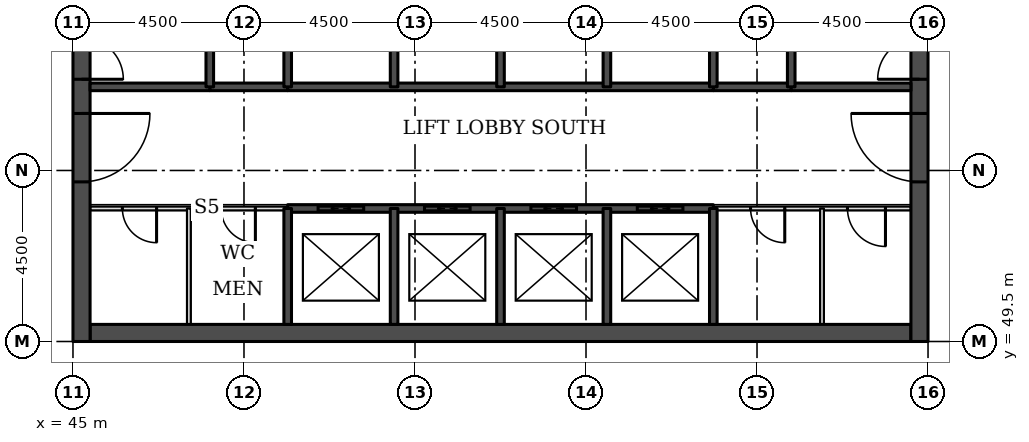
"""IFC4 building model, lengths in metres.
Left out: names, types, materials, properties, quantities, classifications, styles, units other than length and angle.
Written with IfcOpenShell. Run it as: python <this file> out.ifc"""

import sys

from ifc_helpers import new_model, si_unit, direction, frame, frame_2d, origin, place, context, subcontext, project, spatial, rectangle, extrude, element, fill, save


model = new_model("IFC4")
c1 = context("Model", 3, precision=1e-05, world=origin(), true_north=direction((0.0, 1.0)))
c2 = subcontext(c1, "Body", "Model", "MODEL_VIEW")
j1 = project(units=[si_unit("LENGTHUNIT", "METRE"), si_unit("PLANEANGLEUNIT", "RADIAN")], contexts=[c1])
p1 = place(None, origin())
s1 = spatial("IfcSite", under=j1, at=p1, CompositionType="ELEMENT")
p2 = place(p1, origin())
s2 = spatial("IfcBuilding", under=s1, at=p2, CompositionType="ELEMENT")
p3 = place(p2, frame((0.0, 0.0, 134.4)))
s3 = spatial("IfcBuildingStorey", under=s2, at=p3, CompositionType="ELEMENT", Elevation=134.4)
p4 = place(p3, frame((45.45, 49.725, 0.0), z_axis=(0.0, 0.0, 1.0), x_axis=(1.0, 0.0, 0.0)))
e1 = element("IfcWall", 1, at=p4, inside=s3, PredefinedType="SHEAR", context=c2, shape_type="SweptSolid", body=[
    extrude(rectangle(XDim=21.6, YDim=0.45, at=frame_2d((10.8, 0.0))), origin(), (0.0, 0.0, 1.0), 3.7),
])
p5 = place(p3, frame((45.225, 49.5, 0.0), z_axis=(0.0, 0.0, 1.0), x_axis=(0.0, 1.0, 0.0)))
e2 = element("IfcWall", 2, at=p5, inside=s3, PredefinedType="SHEAR", context=c2, shape_type="SweptSolid", body=[
    extrude(rectangle(XDim=22.5, YDim=0.45, at=frame_2d((11.25, 0.0))), origin(), (0.0, 0.0, 1.0), 3.7),
])
p6 = place(p5, frame((4.2, 0.0, 0.0)))
e3 = element("IfcOpeningElement", 3, at=p6, cuts=e2, PredefinedType="OPENING", context=c2, shape_type="SweptSolid", body=[
    extrude(rectangle(XDim=1.8, YDim=2.1, at=frame_2d((0.9, 1.05))), frame((0.0, 0.235, 0.0), z_axis=(0.0, -1.0, 0.0), x_axis=(1.0, 0.0, 0.0)), (0.0, 0.0, 1.0), 0.47),
])
p7 = place(p5, frame((6.9, 0.0, 0.0)))
e4 = element("IfcOpeningElement", 4, at=p7, cuts=e2, PredefinedType="OPENING", context=c2, shape_type="SweptSolid", body=[
    extrude(rectangle(XDim=1.1, YDim=2.1, at=frame_2d((0.55, 1.05))), frame((0.0, 0.235, 0.0), z_axis=(0.0, -1.0, 0.0), x_axis=(1.0, 0.0, 0.0)), (0.0, 0.0, 1.0), 0.47),
])
p8 = place(p5, frame((13.6, 0.0, 0.0)))
e5 = element("IfcOpeningElement", 5, at=p8, cuts=e2, PredefinedType="OPENING", context=c2, shape_type="SweptSolid", body=[
    extrude(rectangle(XDim=1.1, YDim=2.1, at=frame_2d((0.55, 1.05))), frame((0.0, 0.235, 0.0), z_axis=(0.0, -1.0, 0.0), x_axis=(1.0, 0.0, 0.0)), (0.0, 0.0, 1.0), 0.47),
])
p9 = place(p5, frame((16.5, 0.0, 0.0)))
e6 = element("IfcOpeningElement", 6, at=p9, cuts=e2, PredefinedType="OPENING", context=c2, shape_type="SweptSolid", body=[
    extrude(rectangle(XDim=1.8, YDim=2.1, at=frame_2d((0.9, 1.05))), frame((0.0, 0.235, 0.0), z_axis=(0.0, -1.0, 0.0), x_axis=(1.0, 0.0, 0.0)), (0.0, 0.0, 1.0), 0.47),
])
p10 = place(p3, frame((67.275, 49.5, 0.0), z_axis=(0.0, 0.0, 1.0), x_axis=(0.0, 1.0, 0.0)))
e7 = element("IfcWall", 7, at=p10, inside=s3, PredefinedType="SHEAR", context=c2, shape_type="SweptSolid", body=[
    extrude(rectangle(XDim=22.5, YDim=0.45, at=frame_2d((11.25, 0.0))), origin(), (0.0, 0.0, 1.0), 3.7),
])
p11 = place(p10, frame((4.2, 0.0, 0.0)))
e8 = element("IfcOpeningElement", 8, at=p11, cuts=e7, PredefinedType="OPENING", context=c2, shape_type="SweptSolid", body=[
    extrude(rectangle(XDim=1.8, YDim=2.1, at=frame_2d((0.9, 1.05))), frame((0.0, 0.235, 0.0), z_axis=(0.0, -1.0, 0.0), x_axis=(1.0, 0.0, 0.0)), (0.0, 0.0, 1.0), 0.47),
])
p12 = place(p10, frame((6.9, 0.0, 0.0)))
e9 = element("IfcOpeningElement", 9, at=p12, cuts=e7, PredefinedType="OPENING", context=c2, shape_type="SweptSolid", body=[
    extrude(rectangle(XDim=1.1, YDim=2.1, at=frame_2d((0.55, 1.05))), frame((0.0, 0.235, 0.0), z_axis=(0.0, -1.0, 0.0), x_axis=(1.0, 0.0, 0.0)), (0.0, 0.0, 1.0), 0.47),
])
p13 = place(p10, frame((13.6, 0.0, 0.0)))
e10 = element("IfcOpeningElement", 10, at=p13, cuts=e7, PredefinedType="OPENING", context=c2, shape_type="SweptSolid", body=[
    extrude(rectangle(XDim=1.1, YDim=2.1, at=frame_2d((0.55, 1.05))), frame((0.0, 0.235, 0.0), z_axis=(0.0, -1.0, 0.0), x_axis=(1.0, 0.0, 0.0)), (0.0, 0.0, 1.0), 0.47),
])
p14 = place(p10, frame((16.5, 0.0, 0.0)))
e11 = element("IfcOpeningElement", 11, at=p14, cuts=e7, PredefinedType="OPENING", context=c2, shape_type="SweptSolid", body=[
    extrude(rectangle(XDim=1.8, YDim=2.1, at=frame_2d((0.9, 1.05))), frame((0.0, 0.235, 0.0), z_axis=(0.0, -1.0, 0.0), x_axis=(1.0, 0.0, 0.0)), (0.0, 0.0, 1.0), 0.47),
])
p15 = place(p3, frame((45.45, 53.0, 0.0), z_axis=(0.0, 0.0, 1.0), x_axis=(1.0, 0.0, 0.0)))
e12 = element("IfcWall", 12, at=p15, inside=s3, PredefinedType="PARTITIONING", context=c2, shape_type="SweptSolid", body=[
    extrude(rectangle(XDim=5.2, YDim=0.1, at=frame_2d((2.6, 0.0))), origin(), (0.0, 0.0, 1.0), 3.55),
])
p16 = place(p15, frame((0.85, 0.0, 0.0)))
e13 = element("IfcOpeningElement", 13, at=p16, cuts=e12, PredefinedType="OPENING", context=c2, shape_type="SweptSolid", body=[
    extrude(rectangle(XDim=0.9, YDim=2.1, at=frame_2d((0.45, 1.05))), frame((0.0, 0.06, 0.0), z_axis=(0.0, -1.0, 0.0), x_axis=(1.0, 0.0, 0.0)), (0.0, 0.0, 1.0), 0.12),
])
p17 = place(p15, frame((3.45, 0.0, 0.0)))
e14 = element("IfcOpeningElement", 14, at=p17, cuts=e12, PredefinedType="OPENING", context=c2, shape_type="SweptSolid", body=[
    extrude(rectangle(XDim=0.9, YDim=2.1, at=frame_2d((0.45, 1.05))), frame((0.0, 0.06, 0.0), z_axis=(0.0, -1.0, 0.0), x_axis=(1.0, 0.0, 0.0)), (0.0, 0.0, 1.0), 0.12),
])
p18 = place(p3, frame((61.85, 53.0, 0.0), z_axis=(0.0, 0.0, 1.0), x_axis=(1.0, 0.0, 0.0)))
e15 = element("IfcWall", 15, at=p18, inside=s3, PredefinedType="PARTITIONING", context=c2, shape_type="SweptSolid", body=[
    extrude(rectangle(XDim=5.2, YDim=0.1, at=frame_2d((2.6, 0.0))), origin(), (0.0, 0.0, 1.0), 3.55),
])
p19 = place(p18, frame((3.53, 0.0, 0.0)))
e16 = element("IfcOpeningElement", 16, at=p19, cuts=e15, PredefinedType="OPENING", context=c2, shape_type="SweptSolid", body=[
    extrude(rectangle(XDim=1.0, YDim=2.1, at=frame_2d((0.5, 1.05))), frame((0.0, 0.06, 0.0), z_axis=(0.0, -1.0, 0.0), x_axis=(1.0, 0.0, 0.0)), (0.0, 0.0, 1.0), 0.12),
])
p20 = place(p18, frame((0.98, 0.0, 0.0)))
e17 = element("IfcOpeningElement", 17, at=p20, cuts=e15, PredefinedType="OPENING", context=c2, shape_type="SweptSolid", body=[
    extrude(rectangle(XDim=0.9, YDim=2.1, at=frame_2d((0.45, 1.05))), frame((0.0, 0.06, 0.0), z_axis=(0.0, -1.0, 0.0), x_axis=(1.0, 0.0, 0.0)), (0.0, 0.0, 1.0), 0.12),
])
p21 = place(p3, frame((50.65, 53.0, 0.0), z_axis=(0.0, 0.0, 1.0), x_axis=(1.0, 0.0, 0.0)))
e18 = element("IfcWall", 18, at=p21, inside=s3, PredefinedType="SOLIDWALL", context=c2, shape_type="SweptSolid", body=[
    extrude(rectangle(XDim=11.2, YDim=0.2, at=frame_2d((5.6, 0.0))), origin(), (0.0, 0.0, 1.0), 3.55),
])
p22 = place(p21, frame((0.8, 0.0, 0.0)))
e19 = element("IfcOpeningElement", 19, at=p22, cuts=e18, PredefinedType="OPENING", context=c2, shape_type="SweptSolid", body=[
    extrude(rectangle(XDim=1.2, YDim=2.1, at=frame_2d((0.6, 1.05))), frame((0.0, 0.11, 0.0), z_axis=(0.0, -1.0, 0.0), x_axis=(1.0, 0.0, 0.0)), (0.0, 0.0, 1.0), 0.22),
])
p23 = place(p21, frame((3.6, 0.0, 0.0)))
e20 = element("IfcOpeningElement", 20, at=p23, cuts=e18, PredefinedType="OPENING", context=c2, shape_type="SweptSolid", body=[
    extrude(rectangle(XDim=1.2, YDim=2.1, at=frame_2d((0.6, 1.05))), frame((0.0, 0.11, 0.0), z_axis=(0.0, -1.0, 0.0), x_axis=(1.0, 0.0, 0.0)), (0.0, 0.0, 1.0), 0.22),
])
p24 = place(p21, frame((6.4, 0.0, 0.0)))
e21 = element("IfcOpeningElement", 21, at=p24, cuts=e18, PredefinedType="OPENING", context=c2, shape_type="SweptSolid", body=[
    extrude(rectangle(XDim=1.2, YDim=2.1, at=frame_2d((0.6, 1.05))), frame((0.0, 0.11, 0.0), z_axis=(0.0, -1.0, 0.0), x_axis=(1.0, 0.0, 0.0)), (0.0, 0.0, 1.0), 0.22),
])
p25 = place(p21, frame((9.2, 0.0, 0.0)))
e22 = element("IfcOpeningElement", 22, at=p25, cuts=e18, PredefinedType="OPENING", context=c2, shape_type="SweptSolid", body=[
    extrude(rectangle(XDim=1.2, YDim=2.1, at=frame_2d((0.6, 1.05))), frame((0.0, 0.11, 0.0), z_axis=(0.0, -1.0, 0.0), x_axis=(1.0, 0.0, 0.0)), (0.0, 0.0, 1.0), 0.22),
])
for number, where, z_axis, x_axis in (
    (23, (48.6, 56.2, 0.0), (0.0, 0.0, 1.0), (1.0, 0.0, 0.0)),
    (24, (61.85, 56.2, 0.0), (0.0, 0.0, 1.0), (1.0, 0.0, 0.0)),
):
    element("IfcWall", number, at=place(p3, frame(where, z_axis=z_axis, x_axis=x_axis)), inside=s3, PredefinedType="SOLIDWALL", context=c2, shape_type="SweptSolid", body=[
        extrude(rectangle(XDim=2.05, YDim=0.2, at=frame_2d((1.025, 0.0))), origin(), (0.0, 0.0, 1.0), 3.55),
    ])
p26 = place(p3, frame((45.45, 56.2, 0.0), z_axis=(0.0, 0.0, 1.0), x_axis=(1.0, 0.0, 0.0)))
e25 = element("IfcWall", 25, at=p26, inside=s3, PredefinedType="SOLIDWALL", context=c2, shape_type="SweptSolid", body=[
    extrude(rectangle(XDim=3.15, YDim=0.2, at=frame_2d((1.575, 0.0))), origin(), (0.0, 0.0, 1.0), 3.55),
])
p27 = place(p3, frame((50.65, 56.2, 0.0), z_axis=(0.0, 0.0, 1.0), x_axis=(1.0, 0.0, 0.0)))
e26 = element("IfcWall", 26, at=p27, inside=s3, PredefinedType="SOLIDWALL", context=c2, shape_type="SweptSolid", body=[
    extrude(rectangle(XDim=11.2, YDim=0.2, at=frame_2d((5.6, 0.0))), origin(), (0.0, 0.0, 1.0), 3.55),
])
p28 = place(p3, frame((63.9, 56.2, 0.0), z_axis=(0.0, 0.0, 1.0), x_axis=(1.0, 0.0, 0.0)))
e27 = element("IfcWall", 27, at=p28, inside=s3, PredefinedType="SOLIDWALL", context=c2, shape_type="SweptSolid", body=[
    extrude(rectangle(XDim=3.15, YDim=0.2, at=frame_2d((1.575, 0.0))), origin(), (0.0, 0.0, 1.0), 3.55),
])
p29 = place(p3, frame((48.05, 49.95, 0.0), z_axis=(0.0, 0.0, 1.0), x_axis=(0.0, 1.0, 0.0)))
e28 = element("IfcWall", 28, at=p29, inside=s3, PredefinedType="PARTITIONING", context=c2, shape_type="SweptSolid", body=[
    extrude(rectangle(XDim=3.05, YDim=0.1, at=frame_2d((1.525, 0.0))), origin(), (0.0, 0.0, 1.0), 3.55),
])
p30 = place(p3, frame((48.6, 56.2, 0.0), z_axis=(0.0, 0.0, 1.0), x_axis=(0.0, 1.0, 0.0)))
e29 = element("IfcWall", 29, at=p30, inside=s3, PredefinedType="SOLIDWALL", context=c2, shape_type="SweptSolid", body=[
    extrude(rectangle(XDim=5.8, YDim=0.2, at=frame_2d((2.9, 0.0))), origin(), (0.0, 0.0, 1.0), 3.55),
])
p31 = place(p3, frame((50.65, 49.95, 0.0), z_axis=(0.0, 0.0, 1.0), x_axis=(0.0, 1.0, 0.0)))
e30 = element("IfcWall", 30, at=p31, inside=s3, PredefinedType="SOLIDWALL", context=c2, shape_type="SweptSolid", body=[
    extrude(rectangle(XDim=3.05, YDim=0.2, at=frame_2d((1.525, 0.0))), origin(), (0.0, 0.0, 1.0), 3.55),
])
p32 = place(p3, frame((50.65, 56.2, 0.0), z_axis=(0.0, 0.0, 1.0), x_axis=(0.0, 1.0, 0.0)))
e31 = element("IfcWall", 31, at=p32, inside=s3, PredefinedType="SOLIDWALL", context=c2, shape_type="SweptSolid", body=[
    extrude(rectangle(XDim=2.8, YDim=0.2, at=frame_2d((1.4, 0.0))), origin(), (0.0, 0.0, 1.0), 3.55),
])
p33 = place(p3, frame((53.45, 49.95, 0.0), z_axis=(0.0, 0.0, 1.0), x_axis=(0.0, 1.0, 0.0)))
e32 = element("IfcWall", 32, at=p33, inside=s3, PredefinedType="SOLIDWALL", context=c2, shape_type="SweptSolid", body=[
    extrude(rectangle(XDim=3.05, YDim=0.2, at=frame_2d((1.525, 0.0))), origin(), (0.0, 0.0, 1.0), 3.55),
])
p34 = place(p3, frame((53.45, 56.2, 0.0), z_axis=(0.0, 0.0, 1.0), x_axis=(0.0, 1.0, 0.0)))
e33 = element("IfcWall", 33, at=p34, inside=s3, PredefinedType="SOLIDWALL", context=c2, shape_type="SweptSolid", body=[
    extrude(rectangle(XDim=2.8, YDim=0.2, at=frame_2d((1.4, 0.0))), origin(), (0.0, 0.0, 1.0), 3.55),
])
p35 = place(p3, frame((56.25, 49.95, 0.0), z_axis=(0.0, 0.0, 1.0), x_axis=(0.0, 1.0, 0.0)))
e34 = element("IfcWall", 34, at=p35, inside=s3, PredefinedType="SOLIDWALL", context=c2, shape_type="SweptSolid", body=[
    extrude(rectangle(XDim=3.05, YDim=0.2, at=frame_2d((1.525, 0.0))), origin(), (0.0, 0.0, 1.0), 3.55),
])
p36 = place(p3, frame((56.25, 56.2, 0.0), z_axis=(0.0, 0.0, 1.0), x_axis=(0.0, 1.0, 0.0)))
e35 = element("IfcWall", 35, at=p36, inside=s3, PredefinedType="SOLIDWALL", context=c2, shape_type="SweptSolid", body=[
    extrude(rectangle(XDim=2.8, YDim=0.2, at=frame_2d((1.4, 0.0))), origin(), (0.0, 0.0, 1.0), 3.55),
])
p37 = place(p3, frame((59.05, 49.95, 0.0), z_axis=(0.0, 0.0, 1.0), x_axis=(0.0, 1.0, 0.0)))
e36 = element("IfcWall", 36, at=p37, inside=s3, PredefinedType="SOLIDWALL", context=c2, shape_type="SweptSolid", body=[
    extrude(rectangle(XDim=3.05, YDim=0.2, at=frame_2d((1.525, 0.0))), origin(), (0.0, 0.0, 1.0), 3.55),
])
p38 = place(p3, frame((59.05, 56.2, 0.0), z_axis=(0.0, 0.0, 1.0), x_axis=(0.0, 1.0, 0.0)))
e37 = element("IfcWall", 37, at=p38, inside=s3, PredefinedType="SOLIDWALL", context=c2, shape_type="SweptSolid", body=[
    extrude(rectangle(XDim=2.8, YDim=0.2, at=frame_2d((1.4, 0.0))), origin(), (0.0, 0.0, 1.0), 3.55),
])
p39 = place(p3, frame((61.85, 49.95, 0.0), z_axis=(0.0, 0.0, 1.0), x_axis=(0.0, 1.0, 0.0)))
e38 = element("IfcWall", 38, at=p39, inside=s3, PredefinedType="SOLIDWALL", context=c2, shape_type="SweptSolid", body=[
    extrude(rectangle(XDim=3.05, YDim=0.2, at=frame_2d((1.525, 0.0))), origin(), (0.0, 0.0, 1.0), 3.55),
])
p40 = place(p3, frame((61.85, 56.2, 0.0), z_axis=(0.0, 0.0, 1.0), x_axis=(0.0, 1.0, 0.0)))
e39 = element("IfcWall", 39, at=p40, inside=s3, PredefinedType="SOLIDWALL", context=c2, shape_type="SweptSolid", body=[
    extrude(rectangle(XDim=2.8, YDim=0.2, at=frame_2d((1.4, 0.0))), origin(), (0.0, 0.0, 1.0), 3.55),
])
p41 = place(p3, frame((63.9, 56.2, 0.0), z_axis=(0.0, 0.0, 1.0), x_axis=(0.0, 1.0, 0.0)))
e40 = element("IfcWall", 40, at=p41, inside=s3, PredefinedType="SOLIDWALL", context=c2, shape_type="SweptSolid", body=[
    extrude(rectangle(XDim=5.8, YDim=0.2, at=frame_2d((2.9, 0.0))), origin(), (0.0, 0.0, 1.0), 3.55),
])
p42 = place(p3, frame((64.71, 49.95, 0.0), z_axis=(0.0, 0.0, 1.0), x_axis=(0.0, 1.0, 0.0)))
e41 = element("IfcWall", 41, at=p42, inside=s3, PredefinedType="PARTITIONING", context=c2, shape_type="SweptSolid", body=[
    extrude(rectangle(XDim=3.05, YDim=0.1, at=frame_2d((1.525, 0.0))), origin(), (0.0, 0.0, 1.0), 3.55),
])
p43 = place(p22, origin())
e42 = element("IfcDoor", 42, at=p43, inside=s3, OperationType="DOUBLE_DOOR_SLIDING", PredefinedType="DOOR", context=c2, shape_type="SweptSolid", body=[
    extrude(rectangle(XDim=1.2, YDim=2.1, at=frame_2d((0.6, 1.05))), frame((0.0, 0.025, 0.0), z_axis=(0.0, -1.0, 0.0), x_axis=(1.0, 0.0, 0.0)), (0.0, 0.0, 1.0), 0.05),
])
fill(e19, e42)
p44 = place(p23, origin())
e43 = element("IfcDoor", 43, at=p44, inside=s3, OperationType="DOUBLE_DOOR_SLIDING", PredefinedType="DOOR", context=c2, shape_type="SweptSolid", body=[
    extrude(rectangle(XDim=1.2, YDim=2.1, at=frame_2d((0.6, 1.05))), frame((0.0, 0.025, 0.0), z_axis=(0.0, -1.0, 0.0), x_axis=(1.0, 0.0, 0.0)), (0.0, 0.0, 1.0), 0.05),
])
fill(e20, e43)
p45 = place(p24, origin())
e44 = element("IfcDoor", 44, at=p45, inside=s3, OperationType="DOUBLE_DOOR_SLIDING", PredefinedType="DOOR", context=c2, shape_type="SweptSolid", body=[
    extrude(rectangle(XDim=1.2, YDim=2.1, at=frame_2d((0.6, 1.05))), frame((0.0, 0.025, 0.0), z_axis=(0.0, -1.0, 0.0), x_axis=(1.0, 0.0, 0.0)), (0.0, 0.0, 1.0), 0.05),
])
fill(e21, e44)
p46 = place(p25, origin())
e45 = element("IfcDoor", 45, at=p46, inside=s3, OperationType="DOUBLE_DOOR_SLIDING", PredefinedType="DOOR", context=c2, shape_type="SweptSolid", body=[
    extrude(rectangle(XDim=1.2, YDim=2.1, at=frame_2d((0.6, 1.05))), frame((0.0, 0.025, 0.0), z_axis=(0.0, -1.0, 0.0), x_axis=(1.0, 0.0, 0.0)), (0.0, 0.0, 1.0), 0.05),
])
fill(e22, e45)
p47 = place(p6, frame((1.8, 0.0, 0.0), z_axis=(0.0, 0.0, 1.0), x_axis=(-1.0, 0.0, 0.0)))
e46 = element("IfcDoor", 46, at=p47, inside=s3, OperationType="SINGLE_SWING_LEFT", PredefinedType="DOOR", context=c2, shape_type="SweptSolid", body=[
    extrude(rectangle(XDim=1.8, YDim=2.1, at=frame_2d((0.9, 1.05))), frame((0.0, 0.025, 0.0), z_axis=(0.0, -1.0, 0.0), x_axis=(1.0, 0.0, 0.0)), (0.0, 0.0, 1.0), 0.05),
])
fill(e3, e46)
p48 = place(p7, frame((1.1, 0.0, 0.0), z_axis=(0.0, 0.0, 1.0), x_axis=(-1.0, 0.0, 0.0)))
e47 = element("IfcDoor", 47, at=p48, inside=s3, OperationType="SINGLE_SWING_RIGHT", PredefinedType="DOOR", context=c2, shape_type="SweptSolid", body=[
    extrude(rectangle(XDim=1.1, YDim=2.1, at=frame_2d((0.55, 1.05))), frame((0.0, 0.025, 0.0), z_axis=(0.0, -1.0, 0.0), x_axis=(1.0, 0.0, 0.0)), (0.0, 0.0, 1.0), 0.05),
])
fill(e4, e47)
p49 = place(p11, origin())
e48 = element("IfcDoor", 48, at=p49, inside=s3, OperationType="SINGLE_SWING_RIGHT", PredefinedType="DOOR", context=c2, shape_type="SweptSolid", body=[
    extrude(rectangle(XDim=1.8, YDim=2.1, at=frame_2d((0.9, 1.05))), frame((0.0, 0.025, 0.0), z_axis=(0.0, -1.0, 0.0), x_axis=(1.0, 0.0, 0.0)), (0.0, 0.0, 1.0), 0.05),
])
fill(e8, e48)
p50 = place(p12, origin())
e49 = element("IfcDoor", 49, at=p50, inside=s3, OperationType="SINGLE_SWING_LEFT", PredefinedType="DOOR", context=c2, shape_type="SweptSolid", body=[
    extrude(rectangle(XDim=1.1, YDim=2.1, at=frame_2d((0.55, 1.05))), frame((0.0, 0.025, 0.0), z_axis=(0.0, -1.0, 0.0), x_axis=(1.0, 0.0, 0.0)), (0.0, 0.0, 1.0), 0.05),
])
fill(e9, e49)
p51 = place(p19, frame((1.0, 0.0, 0.0), z_axis=(0.0, 0.0, 1.0), x_axis=(-1.0, 0.0, 0.0)))
e50 = element("IfcDoor", 50, at=p51, inside=s3, OperationType="SINGLE_SWING_LEFT", PredefinedType="DOOR", context=c2, shape_type="SweptSolid", body=[
    extrude(rectangle(XDim=1.0, YDim=2.1, at=frame_2d((0.5, 1.05))), frame((0.0, 0.025, 0.0), z_axis=(0.0, -1.0, 0.0), x_axis=(1.0, 0.0, 0.0)), (0.0, 0.0, 1.0), 0.05),
])
fill(e16, e50)
p52 = place(p20, frame((0.9, 0.0, 0.0), z_axis=(0.0, 0.0, 1.0), x_axis=(-1.0, 0.0, 0.0)))
e51 = element("IfcDoor", 51, at=p52, inside=s3, OperationType="SINGLE_SWING_LEFT", PredefinedType="DOOR", context=c2, shape_type="SweptSolid", body=[
    extrude(rectangle(XDim=0.9, YDim=2.1, at=frame_2d((0.45, 1.05))), frame((0.0, 0.025, 0.0), z_axis=(0.0, -1.0, 0.0), x_axis=(1.0, 0.0, 0.0)), (0.0, 0.0, 1.0), 0.05),
])
fill(e17, e51)
p53 = place(p16, frame((0.9, 0.0, 0.0), z_axis=(0.0, 0.0, 1.0), x_axis=(-1.0, 0.0, 0.0)))
e52 = element("IfcDoor", 52, at=p53, inside=s3, OperationType="SINGLE_SWING_LEFT", PredefinedType="DOOR", context=c2, shape_type="SweptSolid", body=[
    extrude(rectangle(XDim=0.9, YDim=2.1, at=frame_2d((0.45, 1.05))), frame((0.0, 0.025, 0.0), z_axis=(0.0, -1.0, 0.0), x_axis=(1.0, 0.0, 0.0)), (0.0, 0.0, 1.0), 0.05),
])
fill(e13, e52)
p54 = place(p17, frame((0.9, 0.0, 0.0), z_axis=(0.0, 0.0, 1.0), x_axis=(-1.0, 0.0, 0.0)))
e53 = element("IfcDoor", 53, at=p54, inside=s3, OperationType="SINGLE_SWING_LEFT", PredefinedType="DOOR", context=c2, shape_type="SweptSolid", body=[
    extrude(rectangle(XDim=0.9, YDim=2.1, at=frame_2d((0.45, 1.05))), frame((0.0, 0.025, 0.0), z_axis=(0.0, -1.0, 0.0), x_axis=(1.0, 0.0, 0.0)), (0.0, 0.0, 1.0), 0.05),
])
fill(e14, e53)
save(model, sys.argv[1])
